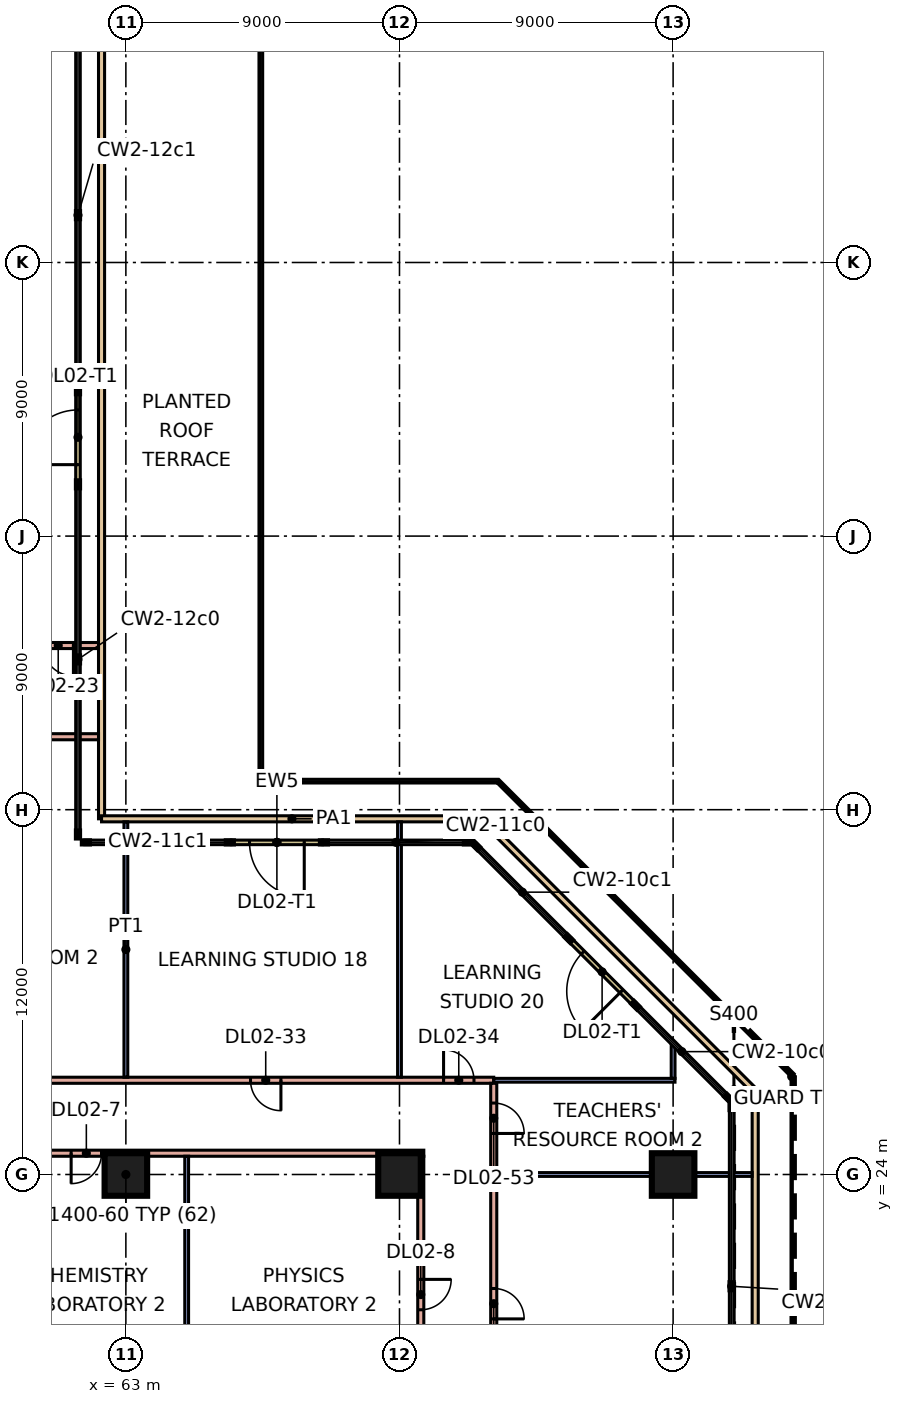
"""IFC4 building model, lengths in metres.
Left out: names, types, materials, properties, quantities, classifications, styles, units other than length and angle.
Written with IfcOpenShell. Run it as: python <this file> out.ifc"""

import sys

from ifc_helpers import new_model, si_unit, direction, frame, frame_2d, origin, origin_2d, place, context, subcontext, project, spatial, rectangle, extrude, element, fill, save


model = new_model("IFC4")
c1 = context("Model", 3, precision=1e-05, world=origin(), true_north=direction((0.0, 1.0)))
c2 = subcontext(c1, "Body", "Model", "MODEL_VIEW")
j1 = project(units=[si_unit("LENGTHUNIT", "METRE"), si_unit("PLANEANGLEUNIT", "RADIAN")], contexts=[c1])
p1 = place(None, origin())
s1 = spatial("IfcSite", under=j1, at=p1, CompositionType="ELEMENT")
p2 = place(p1, origin())
s2 = spatial("IfcBuilding", under=s1, at=p2, CompositionType="ELEMENT")
p3 = place(p2, frame((0.0, 0.0, 12.0)))
s3 = spatial("IfcBuildingStorey", under=s2, at=p3, CompositionType="ELEMENT", Elevation=12.0)
for number, where, z_axis, x_axis in (
    (1, (63.0, 24.0, 0.0), (0.0, 0.0, 1.0), (1.0, 0.0, 0.0)),
    (2, (72.0, 24.0, 0.0), (0.0, 0.0, 1.0), (1.0, 0.0, 0.0)),
    (3, (81.0, 24.0, 0.0), (0.0, 0.0, 1.0), (1.0, 0.0, 0.0)),
):
    element("IfcColumn", number, at=place(p3, frame(where, z_axis=z_axis, x_axis=x_axis)), inside=s3, PredefinedType="COLUMN", context=c2, shape_type="SweptSolid", body=[
        extrude(rectangle(XDim=1.4, YDim=1.4, at=origin_2d()), origin(), (0.0, 0.0, 1.0), 4.8),
    ])
p4 = place(p3, frame((79.725, 29.604, 0.0), z_axis=(0.0, 0.0, 1.0), x_axis=(-0.707106781187, 0.707106781187, 0.0)))
e4 = element("IfcWall", 4, at=p4, inside=s3, PredefinedType="SOLIDWALL", context=c2, shape_type="SweptSolid", body=[
    extrude(rectangle(XDim=3.0, YDim=0.15, at=frame_2d((1.5, 0.0))), origin(), (0.0, 0.0, 1.0), 4.4),
])
p5 = place(p4, frame((0.6, 0.0, 0.0)))
e5 = element("IfcOpeningElement", 5, at=p5, cuts=e4, PredefinedType="OPENING", context=c2, shape_type="SweptSolid", body=[
    extrude(rectangle(XDim=1.8, YDim=2.4, at=frame_2d((0.9, 1.2))), frame((0.0, 0.085, 0.0), z_axis=(0.0, -1.0, 0.0), x_axis=(1.0, 0.0, 0.0)), (0.0, 0.0, 1.0), 0.17),
])
p6 = place(p3, frame((69.468, 34.925, 0.0), z_axis=(0.0, 0.0, 1.0), x_axis=(-1.0, 0.0, 0.0)))
e6 = element("IfcWall", 6, at=p6, inside=s3, PredefinedType="SOLIDWALL", context=c2, shape_type="SweptSolid", body=[
    extrude(rectangle(XDim=3.0, YDim=0.15, at=frame_2d((1.5, 0.0))), origin(), (0.0, 0.0, 1.0), 4.4),
])
p7 = place(p6, frame((0.6, 0.0, 0.0)))
e7 = element("IfcOpeningElement", 7, at=p7, cuts=e6, PredefinedType="OPENING", context=c2, shape_type="SweptSolid", body=[
    extrude(rectangle(XDim=1.8, YDim=2.4, at=frame_2d((0.9, 1.2))), frame((0.0, 0.085, 0.0), z_axis=(0.0, -1.0, 0.0), x_axis=(1.0, 0.0, 0.0)), (0.0, 0.0, 1.0), 0.17),
])
p8 = place(p3, frame((61.425, 46.75, 0.0), z_axis=(0.0, 0.0, 1.0), x_axis=(0.0, 1.0, 0.0)))
e8 = element("IfcWall", 8, at=p8, inside=s3, PredefinedType="SOLIDWALL", context=c2, shape_type="SweptSolid", body=[
    extrude(rectangle(XDim=3.0, YDim=0.15, at=frame_2d((1.5, 0.0))), origin(), (0.0, 0.0, 1.0), 4.4),
])
p9 = place(p8, frame((0.6, 0.0, 0.0)))
e9 = element("IfcOpeningElement", 9, at=p9, cuts=e8, PredefinedType="OPENING", context=c2, shape_type="SweptSolid", body=[
    extrude(rectangle(XDim=1.8, YDim=2.4, at=frame_2d((0.9, 1.2))), frame((0.0, 0.085, 0.0), z_axis=(0.0, -1.0, 0.0), x_axis=(1.0, 0.0, 0.0)), (0.0, 0.0, 1.0), 0.17),
])
p10 = place(p3, frame((62.2, 62.2, 0.0), z_axis=(0.0, 0.0, 1.0), x_axis=(0.0, -1.0, 0.0)))
e10 = element("IfcWall", 10, at=p10, inside=s3, PredefinedType="PARAPET", context=c2, shape_type="SweptSolid", body=[
    extrude(rectangle(XDim=26.5, YDim=0.2, at=frame_2d((13.25, 0.0))), origin(), (0.0, 0.0, 1.0), 0.5),
])
p11 = place(p3, frame((62.2, 35.7, 0.0), z_axis=(0.0, 0.0, 1.0), x_axis=(1.0, 0.0, 0.0)))
e11 = element("IfcWall", 11, at=p11, inside=s3, PredefinedType="PARAPET", context=c2, shape_type="SweptSolid", body=[
    extrude(rectangle(XDim=12.525, YDim=0.2, at=frame_2d((6.263, 0.0))), origin(), (0.0, 0.0, 1.0), 0.5),
])
p12 = place(p3, frame((74.725, 35.7, 0.0), z_axis=(0.0, 0.0, 1.0), x_axis=(0.707106781187, -0.707106781187, 0.0)))
e12 = element("IfcWall", 12, at=p12, inside=s3, PredefinedType="PARAPET", context=c2, shape_type="SweptSolid", body=[
    extrude(rectangle(XDim=12.692, YDim=0.2, at=frame_2d((6.346, 0.0))), origin(), (0.0, 0.0, 1.0), 0.5),
])
p13 = place(p3, frame((83.7, 26.725, 0.0), z_axis=(0.0, 0.0, 1.0), x_axis=(0.0, -1.0, 0.0)))
e13 = element("IfcWall", 13, at=p13, inside=s3, PredefinedType="PARAPET", context=c2, shape_type="SweptSolid", body=[
    extrude(rectangle(XDim=29.45, YDim=0.2, at=frame_2d((14.725, 0.0))), origin(), (0.0, 0.0, 1.0), 0.5),
])
p14 = place(p3, frame((27.0, 38.4, 0.0), z_axis=(0.0, 0.0, 1.0), x_axis=(1.0, 0.0, 0.0)))
e14 = element("IfcWall", 14, at=p14, inside=s3, PredefinedType="PARTITIONING", context=c2, shape_type="SweptSolid", body=[
    extrude(rectangle(XDim=35.1, YDim=0.2, at=frame_2d((17.55, 0.0))), origin(), (0.0, 0.0, 1.0), 4.4),
])
p15 = place(p14, frame((21.9, 0.0, 0.0)))
e15 = element("IfcOpeningElement", 15, at=p15, cuts=e14, PredefinedType="OPENING", context=c2, shape_type="SweptSolid", body=[
    extrude(rectangle(XDim=1.0, YDim=2.1, at=frame_2d((0.5, 1.05))), frame((0.0, 0.11, 0.0), z_axis=(0.0, -1.0, 0.0), x_axis=(1.0, 0.0, 0.0)), (0.0, 0.0, 1.0), 0.22),
])
p16 = place(p14, frame((30.15, 0.0, 0.0)))
e16 = element("IfcOpeningElement", 16, at=p16, cuts=e14, PredefinedType="OPENING", context=c2, shape_type="SweptSolid", body=[
    extrude(rectangle(XDim=1.0, YDim=2.1, at=frame_2d((0.5, 1.05))), frame((0.0, 0.11, 0.0), z_axis=(0.0, -1.0, 0.0), x_axis=(1.0, 0.0, 0.0)), (0.0, 0.0, 1.0), 0.22),
])
p17 = place(p14, frame((9.4, 0.0, 0.0)))
e17 = element("IfcOpeningElement", 17, at=p17, cuts=e14, PredefinedType="OPENING", context=c2, shape_type="SweptSolid", body=[
    extrude(rectangle(XDim=1.8, YDim=2.1, at=frame_2d((0.9, 1.05))), frame((0.0, 0.11, 0.0), z_axis=(0.0, -1.0, 0.0), x_axis=(1.0, 0.0, 0.0)), (0.0, 0.0, 1.0), 0.22),
])
p18 = place(p3, frame((36.1, 41.4, 0.0), z_axis=(0.0, 0.0, 1.0), x_axis=(1.0, 0.0, 0.0)))
e18 = element("IfcWall", 18, at=p18, inside=s3, PredefinedType="PARTITIONING", context=c2, shape_type="SweptSolid", body=[
    extrude(rectangle(XDim=26.0, YDim=0.2, at=frame_2d((13.0, 0.0))), origin(), (0.0, 0.0, 1.0), 4.4),
])
p19 = place(p18, frame((3.45, 0.0, 0.0)))
e19 = element("IfcOpeningElement", 19, at=p19, cuts=e18, PredefinedType="OPENING", context=c2, shape_type="SweptSolid", body=[
    extrude(rectangle(XDim=1.8, YDim=2.1, at=frame_2d((0.9, 1.05))), frame((0.0, 0.11, 0.0), z_axis=(0.0, -1.0, 0.0), x_axis=(1.0, 0.0, 0.0)), (0.0, 0.0, 1.0), 0.22),
])
p20 = place(p18, frame((6.95, 0.0, 0.0)))
e20 = element("IfcOpeningElement", 20, at=p20, cuts=e18, PredefinedType="OPENING", context=c2, shape_type="SweptSolid", body=[
    extrude(rectangle(XDim=1.8, YDim=2.1, at=frame_2d((0.9, 1.05))), frame((0.0, 0.11, 0.0), z_axis=(0.0, -1.0, 0.0), x_axis=(1.0, 0.0, 0.0)), (0.0, 0.0, 1.0), 0.22),
])
p21 = place(p18, frame((12.45, 0.0, 0.0)))
e21 = element("IfcOpeningElement", 21, at=p21, cuts=e18, PredefinedType="OPENING", context=c2, shape_type="SweptSolid", body=[
    extrude(rectangle(XDim=1.8, YDim=2.1, at=frame_2d((0.9, 1.05))), frame((0.0, 0.11, 0.0), z_axis=(0.0, -1.0, 0.0), x_axis=(1.0, 0.0, 0.0)), (0.0, 0.0, 1.0), 0.22),
])
p22 = place(p18, frame((15.95, 0.0, 0.0)))
e22 = element("IfcOpeningElement", 22, at=p22, cuts=e18, PredefinedType="OPENING", context=c2, shape_type="SweptSolid", body=[
    extrude(rectangle(XDim=1.8, YDim=2.1, at=frame_2d((0.9, 1.05))), frame((0.0, 0.11, 0.0), z_axis=(0.0, -1.0, 0.0), x_axis=(1.0, 0.0, 0.0)), (0.0, 0.0, 1.0), 0.22),
])
p23 = place(p18, frame((21.175, 0.0, 0.0)))
e23 = element("IfcOpeningElement", 23, at=p23, cuts=e18, PredefinedType="OPENING", context=c2, shape_type="SweptSolid", body=[
    extrude(rectangle(XDim=1.0, YDim=2.1, at=frame_2d((0.5, 1.05))), frame((0.0, 0.11, 0.0), z_axis=(0.0, -1.0, 0.0), x_axis=(1.0, 0.0, 0.0)), (0.0, 0.0, 1.0), 0.22),
])
p24 = place(p18, frame((24.175, 0.0, 0.0)))
e24 = element("IfcOpeningElement", 24, at=p24, cuts=e18, PredefinedType="OPENING", context=c2, shape_type="SweptSolid", body=[
    extrude(rectangle(XDim=1.0, YDim=2.1, at=frame_2d((0.5, 1.05))), frame((0.0, 0.11, 0.0), z_axis=(0.0, -1.0, 0.0), x_axis=(1.0, 0.0, 0.0)), (0.0, 0.0, 1.0), 0.22),
])
p25 = place(p3, frame((38.3, 27.1, 0.0), z_axis=(0.0, 0.0, 1.0), x_axis=(1.0, 0.0, 0.0)))
e25 = element("IfcWall", 25, at=p25, inside=s3, PredefinedType="PARTITIONING", context=c2, shape_type="SweptSolid", body=[
    extrude(rectangle(XDim=36.8, YDim=0.2, at=frame_2d((18.4, 0.0))), origin(), (0.0, 0.0, 1.0), 4.4),
])
p26 = place(p25, frame((10.8, 0.0, 0.0)))
e26 = element("IfcOpeningElement", 26, at=p26, cuts=e25, PredefinedType="OPENING", context=c2, shape_type="SweptSolid", body=[
    extrude(rectangle(XDim=1.0, YDim=2.1, at=frame_2d((0.5, 1.05))), frame((0.0, 0.11, 0.0), z_axis=(0.0, -1.0, 0.0), x_axis=(1.0, 0.0, 0.0)), (0.0, 0.0, 1.0), 0.22),
])
p27 = place(p25, frame((19.8, 0.0, 0.0)))
e27 = element("IfcOpeningElement", 27, at=p27, cuts=e25, PredefinedType="OPENING", context=c2, shape_type="SweptSolid", body=[
    extrude(rectangle(XDim=1.0, YDim=2.1, at=frame_2d((0.5, 1.05))), frame((0.0, 0.11, 0.0), z_axis=(0.0, -1.0, 0.0), x_axis=(1.0, 0.0, 0.0)), (0.0, 0.0, 1.0), 0.22),
])
p28 = place(p25, frame((28.8, 0.0, 0.0)))
e28 = element("IfcOpeningElement", 28, at=p28, cuts=e25, PredefinedType="OPENING", context=c2, shape_type="SweptSolid", body=[
    extrude(rectangle(XDim=1.0, YDim=2.1, at=frame_2d((0.5, 1.05))), frame((0.0, 0.11, 0.0), z_axis=(0.0, -1.0, 0.0), x_axis=(1.0, 0.0, 0.0)), (0.0, 0.0, 1.0), 0.22),
])
p29 = place(p25, frame((35.15, 0.0, 0.0)))
e29 = element("IfcOpeningElement", 29, at=p29, cuts=e25, PredefinedType="OPENING", context=c2, shape_type="SweptSolid", body=[
    extrude(rectangle(XDim=1.0, YDim=2.1, at=frame_2d((0.5, 1.05))), frame((0.0, 0.11, 0.0), z_axis=(0.0, -1.0, 0.0), x_axis=(1.0, 0.0, 0.0)), (0.0, 0.0, 1.0), 0.22),
])
p30 = place(p3, frame((40.2, 24.7, 0.0), z_axis=(0.0, 0.0, 1.0), x_axis=(1.0, 0.0, 0.0)))
e30 = element("IfcWall", 30, at=p30, inside=s3, PredefinedType="PARTITIONING", context=c2, shape_type="SweptSolid", body=[
    extrude(rectangle(XDim=32.6, YDim=0.2, at=frame_2d((16.3, 0.0))), origin(), (0.0, 0.0, 1.0), 4.4),
])
p31 = place(p30, frame((2.65, 0.0, 0.0)))
e31 = element("IfcOpeningElement", 31, at=p31, cuts=e30, PredefinedType="OPENING", context=c2, shape_type="SweptSolid", body=[
    extrude(rectangle(XDim=1.0, YDim=2.1, at=frame_2d((0.5, 1.05))), frame((0.0, 0.11, 0.0), z_axis=(0.0, -1.0, 0.0), x_axis=(1.0, 0.0, 0.0)), (0.0, 0.0, 1.0), 0.22),
])
p32 = place(p30, frame((8.85, 0.0, 0.0)))
e32 = element("IfcOpeningElement", 32, at=p32, cuts=e30, PredefinedType="OPENING", context=c2, shape_type="SweptSolid", body=[
    extrude(rectangle(XDim=1.0, YDim=2.1, at=frame_2d((0.5, 1.05))), frame((0.0, 0.11, 0.0), z_axis=(0.0, -1.0, 0.0), x_axis=(1.0, 0.0, 0.0)), (0.0, 0.0, 1.0), 0.22),
])
p33 = place(p30, frame((15.05, 0.0, 0.0)))
e33 = element("IfcOpeningElement", 33, at=p33, cuts=e30, PredefinedType="OPENING", context=c2, shape_type="SweptSolid", body=[
    extrude(rectangle(XDim=1.0, YDim=2.1, at=frame_2d((0.5, 1.05))), frame((0.0, 0.11, 0.0), z_axis=(0.0, -1.0, 0.0), x_axis=(1.0, 0.0, 0.0)), (0.0, 0.0, 1.0), 0.22),
])
p34 = place(p30, frame((21.0, 0.0, 0.0)))
e34 = element("IfcOpeningElement", 34, at=p34, cuts=e30, PredefinedType="OPENING", context=c2, shape_type="SweptSolid", body=[
    extrude(rectangle(XDim=1.0, YDim=2.1, at=frame_2d((0.5, 1.05))), frame((0.0, 0.11, 0.0), z_axis=(0.0, -1.0, 0.0), x_axis=(1.0, 0.0, 0.0)), (0.0, 0.0, 1.0), 0.22),
])
p35 = place(p3, frame((63.0, 27.2, 0.0), z_axis=(0.0, 0.0, 1.0), x_axis=(0.0, 1.0, 0.0)))
e35 = element("IfcWall", 35, at=p35, inside=s3, PredefinedType="PARTITIONING", context=c2, shape_type="SweptSolid", body=[
    extrude(rectangle(XDim=8.4, YDim=0.125, at=frame_2d((4.2, 0.0))), origin(), (0.0, 0.0, 1.0), 4.4),
])
p36 = place(p3, frame((65.0, 15.7, 0.0), z_axis=(0.0, 0.0, 1.0), x_axis=(0.0, 1.0, 0.0)))
e36 = element("IfcWall", 36, at=p36, inside=s3, PredefinedType="PARTITIONING", context=c2, shape_type="SweptSolid", body=[
    extrude(rectangle(XDim=8.9, YDim=0.125, at=frame_2d((4.45, 0.0))), origin(), (0.0, 0.0, 1.0), 4.4),
])
p37 = place(p3, frame((72.0, 27.2, 0.0), z_axis=(0.0, 0.0, 1.0), x_axis=(0.0, 1.0, 0.0)))
e37 = element("IfcWall", 37, at=p37, inside=s3, PredefinedType="PARTITIONING", context=c2, shape_type="SweptSolid", body=[
    extrude(rectangle(XDim=8.4, YDim=0.125, at=frame_2d((4.2, 0.0))), origin(), (0.0, 0.0, 1.0), 4.4),
])
p38 = place(p3, frame((72.7, 15.7, 0.0), z_axis=(0.0, 0.0, 1.0), x_axis=(0.0, 1.0, 0.0)))
e38 = element("IfcWall", 38, at=p38, inside=s3, PredefinedType="PARTITIONING", context=c2, shape_type="SweptSolid", body=[
    extrude(rectangle(XDim=8.9, YDim=0.2, at=frame_2d((4.45, 0.0))), origin(), (0.0, 0.0, 1.0), 4.4),
])
p39 = place(p38, frame((3.85, 0.0, 0.0)))
e39 = element("IfcOpeningElement", 39, at=p39, cuts=e38, PredefinedType="OPENING", context=c2, shape_type="SweptSolid", body=[
    extrude(rectangle(XDim=1.0, YDim=2.1, at=frame_2d((0.5, 1.05))), frame((0.0, 0.11, 0.0), z_axis=(0.0, -1.0, 0.0), x_axis=(1.0, 0.0, 0.0)), (0.0, 0.0, 1.0), 0.22),
])
p40 = place(p3, frame((75.1, -3.0, 0.0), z_axis=(0.0, 0.0, 1.0), x_axis=(0.0, 1.0, 0.0)))
e40 = element("IfcWall", 40, at=p40, inside=s3, PredefinedType="PARTITIONING", context=c2, shape_type="SweptSolid", body=[
    extrude(rectangle(XDim=30.0, YDim=0.2, at=frame_2d((15.0, 0.0))), origin(), (0.0, 0.0, 1.0), 4.4),
])
p41 = place(p40, frame((0.55, 0.0, 0.0)))
e41 = element("IfcOpeningElement", 41, at=p41, cuts=e40, PredefinedType="OPENING", context=c2, shape_type="SweptSolid", body=[
    extrude(rectangle(XDim=1.0, YDim=2.1, at=frame_2d((0.5, 1.05))), frame((0.0, 0.11, 0.0), z_axis=(0.0, -1.0, 0.0), x_axis=(1.0, 0.0, 0.0)), (0.0, 0.0, 1.0), 0.22),
])
p42 = place(p40, frame((8.4, 0.0, 0.0)))
e42 = element("IfcOpeningElement", 42, at=p42, cuts=e40, PredefinedType="OPENING", context=c2, shape_type="SweptSolid", body=[
    extrude(rectangle(XDim=1.0, YDim=2.1, at=frame_2d((0.5, 1.05))), frame((0.0, 0.11, 0.0), z_axis=(0.0, -1.0, 0.0), x_axis=(1.0, 0.0, 0.0)), (0.0, 0.0, 1.0), 0.22),
])
p43 = place(p40, frame((3.15, 0.0, 0.0)))
e43 = element("IfcOpeningElement", 43, at=p43, cuts=e40, PredefinedType="OPENING", context=c2, shape_type="SweptSolid", body=[
    extrude(rectangle(XDim=1.0, YDim=2.1, at=frame_2d((0.5, 1.05))), frame((0.0, 0.11, 0.0), z_axis=(0.0, -1.0, 0.0), x_axis=(1.0, 0.0, 0.0)), (0.0, 0.0, 1.0), 0.22),
])
p44 = place(p40, frame((22.25, 0.0, 0.0)))
e44 = element("IfcOpeningElement", 44, at=p44, cuts=e40, PredefinedType="OPENING", context=c2, shape_type="SweptSolid", body=[
    extrude(rectangle(XDim=1.0, YDim=2.1, at=frame_2d((0.5, 1.05))), frame((0.0, 0.11, 0.0), z_axis=(0.0, -1.0, 0.0), x_axis=(1.0, 0.0, 0.0)), (0.0, 0.0, 1.0), 0.22),
])
p45 = place(p40, frame((18.75, 0.0, 0.0)))
e45 = element("IfcOpeningElement", 45, at=p45, cuts=e40, PredefinedType="OPENING", context=c2, shape_type="SweptSolid", body=[
    extrude(rectangle(XDim=1.0, YDim=2.1, at=frame_2d((0.5, 1.05))), frame((0.0, 0.11, 0.0), z_axis=(0.0, -1.0, 0.0), x_axis=(1.0, 0.0, 0.0)), (0.0, 0.0, 1.0), 0.22),
])
p46 = place(p40, frame((28.35, 0.0, 0.0)))
e46 = element("IfcOpeningElement", 46, at=p46, cuts=e40, PredefinedType="OPENING", context=c2, shape_type="SweptSolid", body=[
    extrude(rectangle(XDim=1.0, YDim=2.1, at=frame_2d((0.5, 1.05))), frame((0.0, 0.11, 0.0), z_axis=(0.0, -1.0, 0.0), x_axis=(1.0, 0.0, 0.0)), (0.0, 0.0, 1.0), 0.22),
])
p47 = place(p3, frame((75.1, 27.1, 0.0), z_axis=(0.0, 0.0, 1.0), x_axis=(1.0, 0.0, 0.0)))
e47 = element("IfcWall", 47, at=p47, inside=s3, PredefinedType="PARTITIONING", context=c2, shape_type="SweptSolid", body=[
    extrude(rectangle(XDim=5.962, YDim=0.125, at=frame_2d((2.981, 0.0))), origin(), (0.0, 0.0, 1.0), 4.4),
])
p48 = place(p3, frame((75.2, 24.0, 0.0), z_axis=(0.0, 0.0, 1.0), x_axis=(1.0, 0.0, 0.0)))
e48 = element("IfcWall", 48, at=p48, inside=s3, PredefinedType="PARTITIONING", context=c2, shape_type="SweptSolid", body=[
    extrude(rectangle(XDim=8.4, YDim=0.125, at=frame_2d((4.2, 0.0))), origin(), (0.0, 0.0, 1.0), 4.4),
])
p49 = place(p3, frame((81.0, 27.162, 0.0), z_axis=(0.0, 0.0, 1.0), x_axis=(0.0, 1.0, 0.0)))
e49 = element("IfcWall", 49, at=p49, inside=s3, PredefinedType="PARTITIONING", context=c2, shape_type="SweptSolid", body=[
    extrude(rectangle(XDim=1.167, YDim=0.125, at=frame_2d((0.583, 0.0))), origin(), (0.0, 0.0, 1.0), 4.4),
])
p50 = place(p5, origin())
e50 = element("IfcDoor", 50, at=p50, inside=s3, OperationType="DOUBLE_DOOR_SINGLE_SWING", PredefinedType="DOOR", context=c2, shape_type="SweptSolid", body=[
    extrude(rectangle(XDim=1.8, YDim=2.4, at=frame_2d((0.9, 1.2))), frame((0.0, 0.025, 0.0), z_axis=(0.0, -1.0, 0.0), x_axis=(1.0, 0.0, 0.0)), (0.0, 0.0, 1.0), 0.05),
])
fill(e5, e50)
p51 = place(p7, origin())
e51 = element("IfcDoor", 51, at=p51, inside=s3, OperationType="DOUBLE_DOOR_SINGLE_SWING", PredefinedType="DOOR", context=c2, shape_type="SweptSolid", body=[
    extrude(rectangle(XDim=1.8, YDim=2.4, at=frame_2d((0.9, 1.2))), frame((0.0, 0.025, 0.0), z_axis=(0.0, -1.0, 0.0), x_axis=(1.0, 0.0, 0.0)), (0.0, 0.0, 1.0), 0.05),
])
fill(e7, e51)
p52 = place(p9, origin())
e52 = element("IfcDoor", 52, at=p52, inside=s3, OperationType="DOUBLE_DOOR_SINGLE_SWING", PredefinedType="DOOR", context=c2, shape_type="SweptSolid", body=[
    extrude(rectangle(XDim=1.8, YDim=2.4, at=frame_2d((0.9, 1.2))), frame((0.0, 0.025, 0.0), z_axis=(0.0, -1.0, 0.0), x_axis=(1.0, 0.0, 0.0)), (0.0, 0.0, 1.0), 0.05),
])
fill(e9, e52)
p53 = place(p34, frame((1.0, 0.0, 0.0), z_axis=(0.0, 0.0, 1.0), x_axis=(-1.0, 0.0, 0.0)))
e53 = element("IfcDoor", 53, at=p53, inside=s3, OperationType="SINGLE_SWING_LEFT", PredefinedType="DOOR", context=c2, shape_type="SweptSolid", body=[
    extrude(rectangle(XDim=1.0, YDim=2.1, at=frame_2d((0.5, 1.05))), frame((0.0, 0.025, 0.0), z_axis=(0.0, -1.0, 0.0), x_axis=(1.0, 0.0, 0.0)), (0.0, 0.0, 1.0), 0.05),
])
fill(e34, e53)
p54 = place(p39, origin())
e54 = element("IfcDoor", 54, at=p54, inside=s3, OperationType="SINGLE_SWING_RIGHT", PredefinedType="DOOR", context=c2, shape_type="SweptSolid", body=[
    extrude(rectangle(XDim=1.0, YDim=2.1, at=frame_2d((0.5, 1.05))), frame((0.0, 0.025, 0.0), z_axis=(0.0, -1.0, 0.0), x_axis=(1.0, 0.0, 0.0)), (0.0, 0.0, 1.0), 0.05),
])
fill(e39, e54)
p55 = place(p24, origin())
e55 = element("IfcDoor", 55, at=p55, inside=s3, OperationType="SINGLE_SWING_RIGHT", PredefinedType="DOOR", context=c2, shape_type="SweptSolid", body=[
    extrude(rectangle(XDim=1.0, YDim=2.1, at=frame_2d((0.5, 1.05))), frame((0.0, 0.025, 0.0), z_axis=(0.0, -1.0, 0.0), x_axis=(1.0, 0.0, 0.0)), (0.0, 0.0, 1.0), 0.05),
])
fill(e24, e55)
p56 = place(p28, origin())
e56 = element("IfcDoor", 56, at=p56, inside=s3, OperationType="SINGLE_SWING_RIGHT", PredefinedType="DOOR", context=c2, shape_type="SweptSolid", body=[
    extrude(rectangle(XDim=1.0, YDim=2.1, at=frame_2d((0.5, 1.05))), frame((0.0, 0.025, 0.0), z_axis=(0.0, -1.0, 0.0), x_axis=(1.0, 0.0, 0.0)), (0.0, 0.0, 1.0), 0.05),
])
fill(e28, e56)
p57 = place(p29, origin())
e57 = element("IfcDoor", 57, at=p57, inside=s3, OperationType="SINGLE_SWING_LEFT", PredefinedType="DOOR", context=c2, shape_type="SweptSolid", body=[
    extrude(rectangle(XDim=1.0, YDim=2.1, at=frame_2d((0.5, 1.05))), frame((0.0, 0.025, 0.0), z_axis=(0.0, -1.0, 0.0), x_axis=(1.0, 0.0, 0.0)), (0.0, 0.0, 1.0), 0.05),
])
fill(e29, e57)
p58 = place(p44, frame((1.0, 0.0, 0.0), z_axis=(0.0, 0.0, 1.0), x_axis=(-1.0, 0.0, 0.0)))
e58 = element("IfcDoor", 58, at=p58, inside=s3, OperationType="SINGLE_SWING_LEFT", PredefinedType="DOOR", context=c2, shape_type="SweptSolid", body=[
    extrude(rectangle(XDim=1.0, YDim=2.1, at=frame_2d((0.5, 1.05))), frame((0.0, 0.025, 0.0), z_axis=(0.0, -1.0, 0.0), x_axis=(1.0, 0.0, 0.0)), (0.0, 0.0, 1.0), 0.05),
])
fill(e44, e58)
p59 = place(p46, frame((1.0, 0.0, 0.0), z_axis=(0.0, 0.0, 1.0), x_axis=(-1.0, 0.0, 0.0)))
e59 = element("IfcDoor", 59, at=p59, inside=s3, OperationType="SINGLE_SWING_LEFT", PredefinedType="DOOR", context=c2, shape_type="SweptSolid", body=[
    extrude(rectangle(XDim=1.0, YDim=2.1, at=frame_2d((0.5, 1.05))), frame((0.0, 0.025, 0.0), z_axis=(0.0, -1.0, 0.0), x_axis=(1.0, 0.0, 0.0)), (0.0, 0.0, 1.0), 0.05),
])
fill(e46, e59)
save(model, sys.argv[1])
